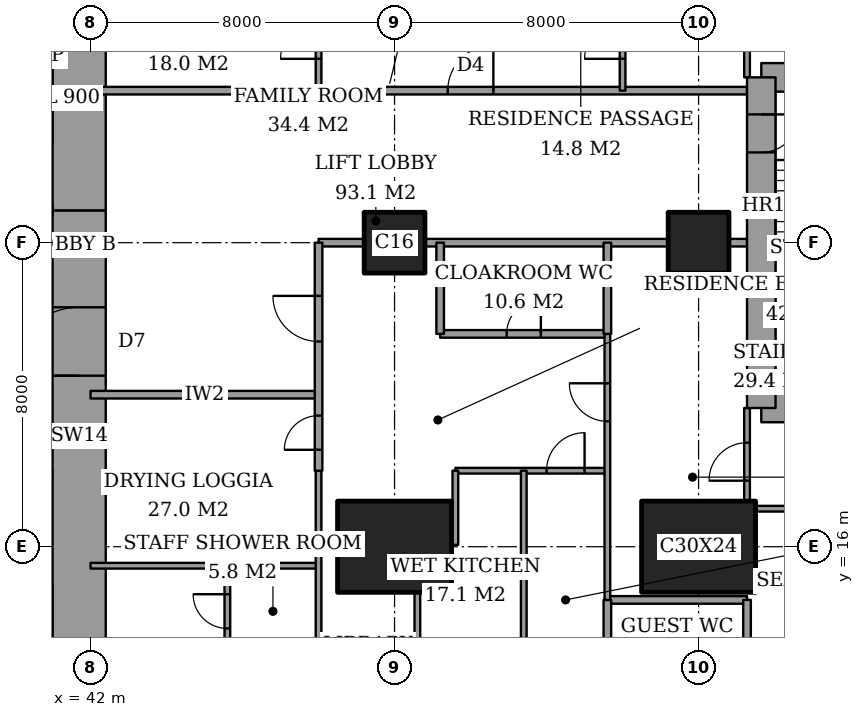
"""IFC4 building model, lengths in metres.
Left out: names, types, materials, properties, quantities, classifications, styles, units other than length and angle.
Written with IfcOpenShell. Run it as: python <this file> out.ifc"""

import sys

from ifc_helpers import new_model, si_unit, direction, frame, frame_2d, origin, origin_2d, place, context, subcontext, project, spatial, rectangle, extrude, element, fill, save


model = new_model("IFC4")
c1 = context("Model", 3, precision=1e-05, world=origin(), true_north=direction((0.0, 1.0)))
c2 = subcontext(c1, "Body", "Model", "MODEL_VIEW")
j1 = project(units=[si_unit("LENGTHUNIT", "METRE"), si_unit("PLANEANGLEUNIT", "RADIAN")], contexts=[c1])
p1 = place(None, origin())
s1 = spatial("IfcSite", under=j1, at=p1, CompositionType="ELEMENT")
p2 = place(p1, origin())
s2 = spatial("IfcBuilding", under=s1, at=p2, CompositionType="ELEMENT")
p3 = place(p2, frame((0.0, 0.0, 259.2)))
s3 = spatial("IfcBuildingStorey", under=s2, at=p3, CompositionType="ELEMENT", Elevation=259.2)
p4 = place(p3, frame((50.0, 16.0, 0.0), z_axis=(0.0, 0.0, 1.0), x_axis=(1.0, 0.0, 0.0)))
e1 = element("IfcColumn", 1, at=p4, inside=s3, PredefinedType="COLUMN", context=c2, shape_type="SweptSolid", body=[
    extrude(rectangle(XDim=3.0, YDim=2.4, at=origin_2d()), origin(), (0.0, 0.0, 1.0), 3.6),
])
p5 = place(p3, frame((50.0, 24.0, 0.0), z_axis=(0.0, 0.0, 1.0), x_axis=(1.0, 0.0, 0.0)))
e2 = element("IfcColumn", 2, at=p5, inside=s3, PredefinedType="COLUMN", context=c2, shape_type="SweptSolid", body=[
    extrude(rectangle(XDim=1.6, YDim=1.6, at=origin_2d()), origin(), (0.0, 0.0, 1.0), 3.6),
])
p6 = place(p3, frame((58.0, 16.0, 0.0), z_axis=(0.0, 0.0, 1.0), x_axis=(1.0, 0.0, 0.0)))
e3 = element("IfcColumn", 3, at=p6, inside=s3, PredefinedType="COLUMN", context=c2, shape_type="SweptSolid", body=[
    extrude(rectangle(XDim=3.0, YDim=2.4, at=origin_2d()), origin(), (0.0, 0.0, 1.0), 3.6),
])
p7 = place(p3, frame((58.0, 24.0, 0.0), z_axis=(0.0, 0.0, 1.0), x_axis=(1.0, 0.0, 0.0)))
e4 = element("IfcColumn", 4, at=p7, inside=s3, PredefinedType="COLUMN", context=c2, shape_type="SweptSolid", body=[
    extrude(rectangle(XDim=1.6, YDim=1.6, at=origin_2d()), origin(), (0.0, 0.0, 1.0), 3.6),
])
p8 = place(p3, frame((41.7, 13.0, 0.0), z_axis=(0.0, 0.0, 1.0), x_axis=(0.0, 1.0, 0.0)))
e5 = element("IfcWall", 5, at=p8, inside=s3, PredefinedType="SHEAR", context=c2, shape_type="SweptSolid", body=[
    extrude(rectangle(XDim=11.85, YDim=1.4, at=frame_2d((5.925, 0.0))), origin(), (0.0, 0.0, 1.0), 3.6),
])
p9 = place(p8, frame((7.5, 0.0, 0.0)))
e6 = element("IfcOpeningElement", 6, at=p9, cuts=e5, PredefinedType="OPENING", context=c2, shape_type="SweptSolid", body=[
    extrude(rectangle(XDim=1.8, YDim=2.4, at=frame_2d((0.9, 1.2))), frame((0.0, 0.71, 0.0), z_axis=(0.0, -1.0, 0.0), x_axis=(1.0, 0.0, 0.0)), (0.0, 0.0, 1.0), 1.42),
])
p10 = place(p3, frame((41.7, 24.85, 0.0), z_axis=(0.0, 0.0, 1.0), x_axis=(0.0, 1.0, 0.0)))
e7 = element("IfcWall", 7, at=p10, inside=s3, PredefinedType="SHEAR", context=c2, shape_type="SweptSolid", body=[
    extrude(rectangle(XDim=10.15, YDim=1.4, at=frame_2d((5.075, 0.0))), origin(), (0.0, 0.0, 1.0), 3.6),
])
for number, where, z_axis, x_axis in (
    (8, (59.65, 19.65, 0.0), (0.0, 0.0, 1.0), (1.0, 0.0, 0.0)),
    (9, (64.1, 28.35, 0.0), (0.0, 0.0, 1.0), (-1.0, 0.0, 0.0)),
):
    element("IfcWall", number, at=place(p3, frame(where, z_axis=z_axis, x_axis=x_axis)), inside=s3, PredefinedType="SHEAR", context=c2, shape_type="SweptSolid", body=[
        extrude(rectangle(XDim=4.45, YDim=0.75, at=frame_2d((2.225, 0.0))), origin(), (0.0, 0.0, 1.0), 3.6),
    ])
p11 = place(p3, frame((59.65, 28.35, 0.0), z_axis=(0.0, 0.0, 1.0), x_axis=(0.0, -1.0, 0.0)))
e10 = element("IfcWall", 10, at=p11, inside=s3, PredefinedType="SHEAR", context=c2, shape_type="SweptSolid", body=[
    extrude(rectangle(XDim=8.7, YDim=0.75, at=frame_2d((4.35, 0.0))), origin(), (0.0, 0.0, 1.0), 3.6),
])
p12 = place(p11, frame((0.975, 0.0, 0.0)))
e11 = element("IfcOpeningElement", 11, at=p12, cuts=e10, PredefinedType="OPENING", context=c2, shape_type="SweptSolid", body=[
    extrude(rectangle(XDim=1.0, YDim=2.1, at=frame_2d((0.5, 1.05))), frame((0.0, 0.385, 0.0), z_axis=(0.0, -1.0, 0.0), x_axis=(1.0, 0.0, 0.0)), (0.0, 0.0, 1.0), 0.77),
])
p13 = place(p3, frame((55.6, 14.6, 0.0), z_axis=(0.0, 0.0, 1.0), x_axis=(1.0, 0.0, 0.0)))
e12 = element("IfcWall", 12, at=p13, inside=s3, PredefinedType="PARTITIONING", context=c2, shape_type="SweptSolid", body=[
    extrude(rectangle(XDim=3.675, YDim=0.2, at=frame_2d((1.837, 0.0))), origin(), (0.0, 0.0, 1.0), 3.35),
])
p14 = place(p3, frame((42.0, 15.5, 0.0), z_axis=(0.0, 0.0, 1.0), x_axis=(1.0, 0.0, 0.0)))
e13 = element("IfcWall", 13, at=p14, inside=s3, PredefinedType="PARTITIONING", context=c2, shape_type="SweptSolid", body=[
    extrude(rectangle(XDim=6.0, YDim=0.15, at=frame_2d((3.0, 0.0))), origin(), (0.0, 0.0, 1.0), 3.35),
])
p15 = place(p3, frame((48.0, 16.05, 0.0), z_axis=(0.0, 0.0, 1.0), x_axis=(1.0, 0.0, 0.0)))
e14 = element("IfcWall", 14, at=p15, inside=s3, PredefinedType="PARTITIONING", context=c2, shape_type="SweptSolid", body=[
    extrude(rectangle(XDim=0.5, YDim=0.15, at=frame_2d((0.25, 0.0))), origin(), (0.0, 0.0, 1.0), 2.634),
])
p16 = place(p3, frame((59.5, 17.0, 0.0), z_axis=(0.0, 0.0, 1.0), x_axis=(1.0, 0.0, 0.0)))
e15 = element("IfcWall", 15, at=p16, inside=s3, PredefinedType="PARTITIONING", context=c2, shape_type="SweptSolid", body=[
    extrude(rectangle(XDim=6.95, YDim=0.15, at=frame_2d((3.475, 0.0))), origin(), (0.0, 0.0, 1.0), 3.35),
])
p17 = place(p3, frame((51.6, 18.0, 0.0), z_axis=(0.0, 0.0, 1.0), x_axis=(1.0, 0.0, 0.0)))
e16 = element("IfcWall", 16, at=p17, inside=s3, PredefinedType="PARTITIONING", context=c2, shape_type="SweptSolid", body=[
    extrude(rectangle(XDim=4.0, YDim=0.15, at=frame_2d((2.0, 0.0))), origin(), (0.0, 0.0, 1.0), 3.35),
])
p18 = place(p17, frame((2.4, 0.0, 0.0)))
e17 = element("IfcOpeningElement", 17, at=p18, cuts=e16, PredefinedType="OPENING", context=c2, shape_type="SweptSolid", body=[
    extrude(rectangle(XDim=1.0, YDim=2.1, at=frame_2d((0.5, 1.05))), frame((0.0, 0.085, 0.0), z_axis=(0.0, -1.0, 0.0), x_axis=(1.0, 0.0, 0.0)), (0.0, 0.0, 1.0), 0.17),
])
p19 = place(p3, frame((42.0, 20.0, 0.0), z_axis=(0.0, 0.0, 1.0), x_axis=(1.0, 0.0, 0.0)))
e18 = element("IfcWall", 18, at=p19, inside=s3, PredefinedType="PARTITIONING", context=c2, shape_type="SweptSolid", body=[
    extrude(rectangle(XDim=6.0, YDim=0.2, at=frame_2d((3.0, 0.0))), origin(), (0.0, 0.0, 1.0), 3.35),
])
p20 = place(p3, frame((51.2, 21.6, 0.0), z_axis=(0.0, 0.0, 1.0), x_axis=(1.0, 0.0, 0.0)))
e19 = element("IfcWall", 19, at=p20, inside=s3, PredefinedType="PARTITIONING", context=c2, shape_type="SweptSolid", body=[
    extrude(rectangle(XDim=4.4, YDim=0.2, at=frame_2d((2.2, 0.0))), origin(), (0.0, 0.0, 1.0), 3.35),
])
p21 = place(p20, frame((1.75, 0.0, 0.0)))
e20 = element("IfcOpeningElement", 20, at=p21, cuts=e19, PredefinedType="OPENING", context=c2, shape_type="SweptSolid", body=[
    extrude(rectangle(XDim=0.9, YDim=2.1, at=frame_2d((0.45, 1.05))), frame((0.0, 0.11, 0.0), z_axis=(0.0, -1.0, 0.0), x_axis=(1.0, 0.0, 0.0)), (0.0, 0.0, 1.0), 0.22),
])
p22 = place(p3, frame((48.0, 24.0, 0.0), z_axis=(0.0, 0.0, 1.0), x_axis=(1.0, 0.0, 0.0)))
e21 = element("IfcWall", 21, at=p22, inside=s3, PredefinedType="PARTITIONING", context=c2, shape_type="SweptSolid", body=[
    extrude(rectangle(XDim=1.2, YDim=0.2, at=frame_2d((0.6, 0.0))), origin(), (0.0, 0.0, 1.0), 3.35),
])
p23 = place(p3, frame((50.8, 24.0, 0.0), z_axis=(0.0, 0.0, 1.0), x_axis=(1.0, 0.0, 0.0)))
e22 = element("IfcWall", 22, at=p23, inside=s3, PredefinedType="PARTITIONING", context=c2, shape_type="SweptSolid", body=[
    extrude(rectangle(XDim=6.4, YDim=0.2, at=frame_2d((3.2, 0.0))), origin(), (0.0, 0.0, 1.0), 3.35),
])
p24 = place(p3, frame((58.8, 24.0, 0.0), z_axis=(0.0, 0.0, 1.0), x_axis=(1.0, 0.0, 0.0)))
e23 = element("IfcWall", 23, at=p24, inside=s3, PredefinedType="PARTITIONING", context=c2, shape_type="SweptSolid", body=[
    extrude(rectangle(XDim=0.475, YDim=0.2, at=frame_2d((0.237, 0.0))), origin(), (0.0, 0.0, 1.0), 3.35),
])
p25 = place(p3, frame((42.0, 28.0, 0.0), z_axis=(0.0, 0.0, 1.0), x_axis=(1.0, 0.0, 0.0)))
e24 = element("IfcWall", 24, at=p25, inside=s3, PredefinedType="PARTITIONING", context=c2, shape_type="SweptSolid", body=[
    extrude(rectangle(XDim=17.275, YDim=0.2, at=frame_2d((8.637, 0.0))), origin(), (0.0, 0.0, 1.0), 3.35),
])
p26 = place(p25, frame((9.4, 0.0, 0.0)))
e25 = element("IfcOpeningElement", 25, at=p26, cuts=e24, PredefinedType="OPENING", context=c2, shape_type="SweptSolid", body=[
    extrude(rectangle(XDim=1.2, YDim=2.4, at=frame_2d((0.6, 1.2))), frame((0.0, 0.11, 0.0), z_axis=(0.0, -1.0, 0.0), x_axis=(1.0, 0.0, 0.0)), (0.0, 0.0, 1.0), 0.22),
])
p27 = place(p3, frame((45.6, 13.1, 0.0), z_axis=(0.0, 0.0, 1.0), x_axis=(0.0, 1.0, 0.0)))
e26 = element("IfcWall", 26, at=p27, inside=s3, PredefinedType="PARTITIONING", context=c2, shape_type="SweptSolid", body=[
    extrude(rectangle(XDim=2.4, YDim=0.15, at=frame_2d((1.2, 0.0))), origin(), (0.0, 0.0, 1.0), 3.35),
])
p28 = place(p27, frame((0.75, 0.0, 0.0)))
e27 = element("IfcOpeningElement", 27, at=p28, cuts=e26, PredefinedType="OPENING", context=c2, shape_type="SweptSolid", body=[
    extrude(rectangle(XDim=0.9, YDim=2.1, at=frame_2d((0.45, 1.05))), frame((0.0, 0.085, 0.0), z_axis=(0.0, -1.0, 0.0), x_axis=(1.0, 0.0, 0.0)), (0.0, 0.0, 1.0), 0.17),
])
p29 = place(p3, frame((48.0, 18.0, 0.0), z_axis=(0.0, 0.0, 1.0), x_axis=(0.0, 1.0, 0.0)))
e28 = element("IfcWall", 28, at=p29, inside=s3, PredefinedType="PARTITIONING", context=c2, shape_type="SweptSolid", body=[
    extrude(rectangle(XDim=6.0, YDim=0.2, at=frame_2d((3.0, 0.0))), origin(), (0.0, 0.0, 1.0), 3.35),
])
p30 = place(p29, frame((3.4, 0.0, 0.0)))
e29 = element("IfcOpeningElement", 29, at=p30, cuts=e28, PredefinedType="OPENING", context=c2, shape_type="SweptSolid", body=[
    extrude(rectangle(XDim=1.2, YDim=2.4, at=frame_2d((0.6, 1.2))), frame((0.0, 0.11, 0.0), z_axis=(0.0, -1.0, 0.0), x_axis=(1.0, 0.0, 0.0)), (0.0, 0.0, 1.0), 0.22),
])
p31 = place(p29, frame((0.55, 0.0, 0.0)))
e30 = element("IfcOpeningElement", 30, at=p31, cuts=e28, PredefinedType="OPENING", context=c2, shape_type="SweptSolid", body=[
    extrude(rectangle(XDim=0.9, YDim=2.1, at=frame_2d((0.45, 1.05))), frame((0.0, 0.11, 0.0), z_axis=(0.0, -1.0, 0.0), x_axis=(1.0, 0.0, 0.0)), (0.0, 0.0, 1.0), 0.22),
])
p32 = place(p3, frame((48.0, 11.2, 0.0), z_axis=(0.0, 0.0, 1.0), x_axis=(0.0, 1.0, 0.0)))
e31 = element("IfcWall", 31, at=p32, inside=s3, PredefinedType="PARTITIONING", context=c2, shape_type="SweptSolid", body=[
    extrude(rectangle(XDim=6.8, YDim=0.15, at=frame_2d((3.4, 0.0))), origin(), (0.0, 0.0, 1.0), 3.35),
])
p33 = place(p3, frame((48.0, 28.0, 0.0), z_axis=(0.0, 0.0, 1.0), x_axis=(0.0, 1.0, 0.0)))
e32 = element("IfcWall", 32, at=p33, inside=s3, PredefinedType="PARTITIONING", context=c2, shape_type="SweptSolid", body=[
    extrude(rectangle(XDim=9.4, YDim=0.15, at=frame_2d((4.7, 0.0))), origin(), (0.0, 0.0, 1.0), 3.35),
])
p34 = place(p33, frame((0.837, 0.0, 0.0)))
e33 = element("IfcOpeningElement", 33, at=p34, cuts=e32, PredefinedType="OPENING", context=c2, shape_type="SweptSolid", body=[
    extrude(rectangle(XDim=1.0, YDim=2.1, at=frame_2d((0.5, 1.05))), frame((0.0, 0.085, 0.0), z_axis=(0.0, -1.0, 0.0), x_axis=(1.0, 0.0, 0.0)), (0.0, 0.0, 1.0), 0.17),
])
p35 = place(p3, frame((50.6, 11.2, 0.0), z_axis=(0.0, 0.0, 1.0), x_axis=(0.0, 1.0, 0.0)))
e34 = element("IfcWall", 34, at=p35, inside=s3, PredefinedType="PARTITIONING", context=c2, shape_type="SweptSolid", body=[
    extrude(rectangle(XDim=3.6, YDim=0.15, at=frame_2d((1.8, 0.0))), origin(), (0.0, 0.0, 1.0), 3.35),
])
p36 = place(p3, frame((51.2, 21.6, 0.0), z_axis=(0.0, 0.0, 1.0), x_axis=(0.0, 1.0, 0.0)))
e35 = element("IfcWall", 35, at=p36, inside=s3, PredefinedType="PARTITIONING", context=c2, shape_type="SweptSolid", body=[
    extrude(rectangle(XDim=2.4, YDim=0.2, at=frame_2d((1.2, 0.0))), origin(), (0.0, 0.0, 1.0), 3.35),
])
p37 = place(p3, frame((51.6, 16.05, 0.0), z_axis=(0.0, 0.0, 1.0), x_axis=(0.0, 1.0, 0.0)))
e36 = element("IfcWall", 36, at=p37, inside=s3, PredefinedType="PARTITIONING", context=c2, shape_type="SweptSolid", body=[
    extrude(rectangle(XDim=1.95, YDim=0.15, at=frame_2d((0.975, 0.0))), origin(), (0.0, 0.0, 1.0), 3.35),
])
p38 = place(p3, frame((53.4, 11.2, 0.0), z_axis=(0.0, 0.0, 1.0), x_axis=(0.0, 1.0, 0.0)))
e37 = element("IfcWall", 37, at=p38, inside=s3, PredefinedType="PARTITIONING", context=c2, shape_type="SweptSolid", body=[
    extrude(rectangle(XDim=6.8, YDim=0.15, at=frame_2d((3.4, 0.0))), origin(), (0.0, 0.0, 1.0), 3.35),
])
p39 = place(p3, frame((55.6, 11.2, 0.0), z_axis=(0.0, 0.0, 1.0), x_axis=(0.0, 1.0, 0.0)))
e38 = element("IfcWall", 38, at=p39, inside=s3, PredefinedType="PARTITIONING", context=c2, shape_type="SweptSolid", body=[
    extrude(rectangle(XDim=3.4, YDim=0.2, at=frame_2d((1.7, 0.0))), origin(), (0.0, 0.0, 1.0), 3.35),
])
p40 = place(p3, frame((55.6, 21.6, 0.0), z_axis=(0.0, 0.0, 1.0), x_axis=(0.0, 1.0, 0.0)))
e39 = element("IfcWall", 39, at=p40, inside=s3, PredefinedType="PARTITIONING", context=c2, shape_type="SweptSolid", body=[
    extrude(rectangle(XDim=2.4, YDim=0.2, at=frame_2d((1.2, 0.0))), origin(), (0.0, 0.0, 1.0), 3.35),
])
p41 = place(p3, frame((55.6, 14.6, 0.0), z_axis=(0.0, 0.0, 1.0), x_axis=(0.0, 1.0, 0.0)))
e40 = element("IfcWall", 40, at=p41, inside=s3, PredefinedType="PARTITIONING", context=c2, shape_type="SweptSolid", body=[
    extrude(rectangle(XDim=7.0, YDim=0.15, at=frame_2d((3.5, 0.0))), origin(), (0.0, 0.0, 1.0), 3.35),
])
p42 = place(p41, frame((4.7, 0.0, 0.0)))
e41 = element("IfcOpeningElement", 41, at=p42, cuts=e40, PredefinedType="OPENING", context=c2, shape_type="SweptSolid", body=[
    extrude(rectangle(XDim=1.0, YDim=2.1, at=frame_2d((0.5, 1.05))), frame((0.0, 0.085, 0.0), z_axis=(0.0, -1.0, 0.0), x_axis=(1.0, 0.0, 0.0)), (0.0, 0.0, 1.0), 0.17),
])
p43 = place(p3, frame((56.0, 28.0, 0.0), z_axis=(0.0, 0.0, 1.0), x_axis=(0.0, 1.0, 0.0)))
e42 = element("IfcWall", 42, at=p43, inside=s3, PredefinedType="PARTITIONING", context=c2, shape_type="SweptSolid", body=[
    extrude(rectangle(XDim=9.4, YDim=0.15, at=frame_2d((4.7, 0.0))), origin(), (0.0, 0.0, 1.0), 3.35),
])
p44 = place(p43, frame((0.837, 0.0, 0.0)))
e43 = element("IfcOpeningElement", 43, at=p44, cuts=e42, PredefinedType="OPENING", context=c2, shape_type="SweptSolid", body=[
    extrude(rectangle(XDim=1.0, YDim=2.1, at=frame_2d((0.5, 1.05))), frame((0.0, 0.085, 0.0), z_axis=(0.0, -1.0, 0.0), x_axis=(1.0, 0.0, 0.0)), (0.0, 0.0, 1.0), 0.17),
])
p45 = place(p3, frame((59.275, 11.2, 0.0), z_axis=(0.0, 0.0, 1.0), x_axis=(0.0, 1.0, 0.0)))
e44 = element("IfcWall", 44, at=p45, inside=s3, PredefinedType="PARTITIONING", context=c2, shape_type="SweptSolid", body=[
    extrude(rectangle(XDim=3.4, YDim=0.2, at=frame_2d((1.7, 0.0))), origin(), (0.0, 0.0, 1.0), 3.35),
])
p46 = place(p3, frame((59.275, 17.2, 0.0), z_axis=(0.0, 0.0, 1.0), x_axis=(0.0, 1.0, 0.0)))
e45 = element("IfcWall", 45, at=p46, inside=s3, PredefinedType="PARTITIONING", context=c2, shape_type="SweptSolid", body=[
    extrude(rectangle(XDim=2.45, YDim=0.15, at=frame_2d((1.225, 0.0))), origin(), (0.0, 0.0, 1.0), 3.35),
])
p47 = place(p46, frame((0.538, 0.0, 0.0)))
e46 = element("IfcOpeningElement", 46, at=p47, cuts=e45, PredefinedType="OPENING", context=c2, shape_type="SweptSolid", body=[
    extrude(rectangle(XDim=1.0, YDim=2.1, at=frame_2d((0.5, 1.05))), frame((0.0, 0.085, 0.0), z_axis=(0.0, -1.0, 0.0), x_axis=(1.0, 0.0, 0.0)), (0.0, 0.0, 1.0), 0.17),
])
p48 = place(p3, frame((59.275, 28.35, 0.0), z_axis=(0.0, 0.0, 1.0), x_axis=(0.0, 1.0, 0.0)))
e47 = element("IfcWall", 47, at=p48, inside=s3, PredefinedType="PARTITIONING", context=c2, shape_type="SweptSolid", body=[
    extrude(rectangle(XDim=2.45, YDim=0.15, at=frame_2d((1.225, 0.0))), origin(), (0.0, 0.0, 1.0), 3.35),
])
p49 = place(p48, frame((0.962, 0.0, 0.0)))
e48 = element("IfcOpeningElement", 48, at=p49, cuts=e47, PredefinedType="OPENING", context=c2, shape_type="SweptSolid", body=[
    extrude(rectangle(XDim=0.9, YDim=2.1, at=frame_2d((0.45, 1.05))), frame((0.0, 0.085, 0.0), z_axis=(0.0, -1.0, 0.0), x_axis=(1.0, 0.0, 0.0)), (0.0, 0.0, 1.0), 0.17),
])
p50 = place(p3, frame((28.3, 17.9, 0.0), z_axis=(0.0, 0.0, 1.0), x_axis=(1.0, 0.0, 0.0)))
e49 = element("IfcWall", 49, at=p50, inside=s3, PredefinedType="PARTITIONING", context=c2, shape_type="SweptSolid", body=[
    extrude(rectangle(XDim=12.7, YDim=0.2, at=frame_2d((6.35, 0.0))), origin(), (0.0, 0.0, 1.0), 3.6),
])
p51 = place(p50, frame((1.05, 0.0, 0.0)))
e50 = element("IfcOpeningElement", 50, at=p51, cuts=e49, PredefinedType="OPENING", context=c2, shape_type="SweptSolid", body=[
    extrude(rectangle(XDim=0.9, YDim=2.1, at=frame_2d((0.45, 1.05))), frame((0.0, 0.11, 0.0), z_axis=(0.0, -1.0, 0.0), x_axis=(1.0, 0.0, 0.0)), (0.0, 0.0, 1.0), 0.22),
])
p52 = place(p50, frame((4.25, 0.0, 0.0)))
e51 = element("IfcOpeningElement", 51, at=p52, cuts=e49, PredefinedType="OPENING", context=c2, shape_type="SweptSolid", body=[
    extrude(rectangle(XDim=0.9, YDim=2.1, at=frame_2d((0.45, 1.05))), frame((0.0, 0.11, 0.0), z_axis=(0.0, -1.0, 0.0), x_axis=(1.0, 0.0, 0.0)), (0.0, 0.0, 1.0), 0.22),
])
p53 = place(p50, frame((10.6, 0.0, 0.0)))
e52 = element("IfcOpeningElement", 52, at=p53, cuts=e49, PredefinedType="OPENING", context=c2, shape_type="SweptSolid", body=[
    extrude(rectangle(XDim=1.2, YDim=2.1, at=frame_2d((0.6, 1.05))), frame((0.0, 0.11, 0.0), z_axis=(0.0, -1.0, 0.0), x_axis=(1.0, 0.0, 0.0)), (0.0, 0.0, 1.0), 0.22),
])
p54 = place(p47, origin())
e53 = element("IfcDoor", 53, at=p54, inside=s3, OperationType="SINGLE_SWING_RIGHT", PredefinedType="DOOR", context=c2, shape_type="SweptSolid", body=[
    extrude(rectangle(XDim=1.0, YDim=2.1, at=frame_2d((0.5, 1.05))), frame((0.0, 0.025, 0.0), z_axis=(0.0, -1.0, 0.0), x_axis=(1.0, 0.0, 0.0)), (0.0, 0.0, 1.0), 0.05),
])
fill(e46, e53)
p55 = place(p42, origin())
e54 = element("IfcDoor", 54, at=p55, inside=s3, OperationType="SINGLE_SWING_LEFT", PredefinedType="DOOR", context=c2, shape_type="SweptSolid", body=[
    extrude(rectangle(XDim=1.0, YDim=2.1, at=frame_2d((0.5, 1.05))), frame((0.0, 0.025, 0.0), z_axis=(0.0, -1.0, 0.0), x_axis=(1.0, 0.0, 0.0)), (0.0, 0.0, 1.0), 0.05),
])
fill(e41, e54)
p56 = place(p21, origin())
e55 = element("IfcDoor", 55, at=p56, inside=s3, OperationType="SINGLE_SWING_LEFT", PredefinedType="DOOR", context=c2, shape_type="SweptSolid", body=[
    extrude(rectangle(XDim=0.9, YDim=2.1, at=frame_2d((0.45, 1.05))), frame((0.0, 0.025, 0.0), z_axis=(0.0, -1.0, 0.0), x_axis=(1.0, 0.0, 0.0)), (0.0, 0.0, 1.0), 0.05),
])
fill(e20, e55)
p57 = place(p30, origin())
e56 = element("IfcDoor", 56, at=p57, inside=s3, OperationType="SINGLE_SWING_LEFT", PredefinedType="DOOR", context=c2, shape_type="SweptSolid", body=[
    extrude(rectangle(XDim=1.2, YDim=2.4, at=frame_2d((0.6, 1.2))), frame((0.0, 0.025, 0.0), z_axis=(0.0, -1.0, 0.0), x_axis=(1.0, 0.0, 0.0)), (0.0, 0.0, 1.0), 0.05),
])
fill(e29, e56)
p58 = place(p18, origin())
e57 = element("IfcDoor", 57, at=p58, inside=s3, OperationType="SINGLE_SWING_LEFT", PredefinedType="DOOR", context=c2, shape_type="SweptSolid", body=[
    extrude(rectangle(XDim=1.0, YDim=2.1, at=frame_2d((0.5, 1.05))), frame((0.0, 0.025, 0.0), z_axis=(0.0, -1.0, 0.0), x_axis=(1.0, 0.0, 0.0)), (0.0, 0.0, 1.0), 0.05),
])
fill(e17, e57)
p59 = place(p28, origin())
e58 = element("IfcDoor", 58, at=p59, inside=s3, OperationType="SINGLE_SWING_LEFT", PredefinedType="DOOR", context=c2, shape_type="SweptSolid", body=[
    extrude(rectangle(XDim=0.9, YDim=2.1, at=frame_2d((0.45, 1.05))), frame((0.0, 0.025, 0.0), z_axis=(0.0, -1.0, 0.0), x_axis=(1.0, 0.0, 0.0)), (0.0, 0.0, 1.0), 0.05),
])
fill(e27, e58)
p60 = place(p31, origin())
e59 = element("IfcDoor", 59, at=p60, inside=s3, OperationType="SINGLE_SWING_RIGHT", PredefinedType="DOOR", context=c2, shape_type="SweptSolid", body=[
    extrude(rectangle(XDim=0.9, YDim=2.1, at=frame_2d((0.45, 1.05))), frame((0.0, 0.025, 0.0), z_axis=(0.0, -1.0, 0.0), x_axis=(1.0, 0.0, 0.0)), (0.0, 0.0, 1.0), 0.05),
])
fill(e30, e59)
p61 = place(p44, origin())
e60 = element("IfcDoor", 60, at=p61, inside=s3, OperationType="SINGLE_SWING_RIGHT", PredefinedType="DOOR", context=c2, shape_type="SweptSolid", body=[
    extrude(rectangle(XDim=1.0, YDim=2.1, at=frame_2d((0.5, 1.05))), frame((0.0, 0.025, 0.0), z_axis=(0.0, -1.0, 0.0), x_axis=(1.0, 0.0, 0.0)), (0.0, 0.0, 1.0), 0.05),
])
fill(e43, e60)
p62 = place(p26, origin())
e61 = element("IfcDoor", 61, at=p62, inside=s3, OperationType="SINGLE_SWING_LEFT", PredefinedType="DOOR", context=c2, shape_type="SweptSolid", body=[
    extrude(rectangle(XDim=1.2, YDim=2.4, at=frame_2d((0.6, 1.2))), frame((0.0, 0.025, 0.0), z_axis=(0.0, -1.0, 0.0), x_axis=(1.0, 0.0, 0.0)), (0.0, 0.0, 1.0), 0.05),
])
fill(e25, e61)
p63 = place(p34, origin())
e62 = element("IfcDoor", 62, at=p63, inside=s3, OperationType="SINGLE_SWING_RIGHT", PredefinedType="DOOR", context=c2, shape_type="SweptSolid", body=[
    extrude(rectangle(XDim=1.0, YDim=2.1, at=frame_2d((0.5, 1.05))), frame((0.0, 0.025, 0.0), z_axis=(0.0, -1.0, 0.0), x_axis=(1.0, 0.0, 0.0)), (0.0, 0.0, 1.0), 0.05),
])
fill(e33, e62)
p64 = place(p9, origin())
e63 = element("IfcDoor", 63, at=p64, inside=s3, OperationType="DOUBLE_DOOR_DOUBLE_SWING", PredefinedType="DOOR", context=c2, shape_type="SweptSolid", body=[
    extrude(rectangle(XDim=1.8, YDim=2.4, at=frame_2d((0.9, 1.2))), frame((0.0, 0.025, 0.0), z_axis=(0.0, -1.0, 0.0), x_axis=(1.0, 0.0, 0.0)), (0.0, 0.0, 1.0), 0.05),
])
fill(e6, e63)
p65 = place(p12, origin())
e64 = element("IfcDoor", 64, at=p65, inside=s3, OperationType="SINGLE_SWING_RIGHT", PredefinedType="DOOR", context=c2, shape_type="SweptSolid", body=[
    extrude(rectangle(XDim=1.0, YDim=2.1, at=frame_2d((0.5, 1.05))), frame((0.0, 0.025, 0.0), z_axis=(0.0, -1.0, 0.0), x_axis=(1.0, 0.0, 0.0)), (0.0, 0.0, 1.0), 0.05),
])
fill(e11, e64)
save(model, sys.argv[1])
